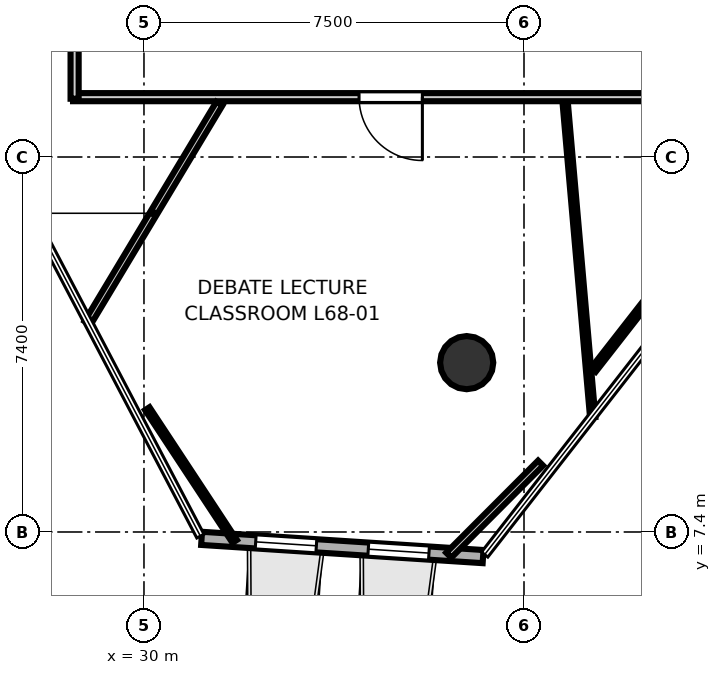
"""IFC4 building model, lengths in metres.
Left out: names, types, materials, properties, quantities, classifications, styles, units other than length and angle.
Written with IfcOpenShell. Run it as: python <this file> out.ifc"""

import sys

from ifc_helpers import new_model, si_unit, direction, frame, frame_2d, origin, origin_2d, place, context, subcontext, project, spatial, rectangle, hollow_circle, extrude, element, fill, save


model = new_model("IFC4")
c1 = context("Model", 3, precision=1e-05, world=origin(), true_north=direction((0.0, 1.0)))
c2 = subcontext(c1, "Body", "Model", "MODEL_VIEW")
j1 = project(units=[si_unit("LENGTHUNIT", "METRE"), si_unit("PLANEANGLEUNIT", "RADIAN")], contexts=[c1])
p1 = place(None, origin())
s1 = spatial("IfcSite", under=j1, at=p1, CompositionType="ELEMENT")
p2 = place(p1, origin())
s2 = spatial("IfcBuilding", under=s1, at=p2, CompositionType="ELEMENT")
p3 = place(p2, frame((0.0, 0.0, 264.9)))
s3 = spatial("IfcBuildingStorey", under=s2, at=p3, CompositionType="ELEMENT", Elevation=264.9)
p4 = place(p3, frame((36.369, 10.742, 0.0), z_axis=(0.0, 0.0, 1.0), x_axis=(1.0, 0.0, 0.0)))
e1 = element("IfcColumn", 1, at=p4, inside=s3, PredefinedType="COLUMN", context=c2, shape_type="SweptSolid", body=[
    extrude(hollow_circle(Radius=0.525, WallThickness=0.028, at=origin_2d()), origin(), (0.0, 0.0, 1.0), 3.7),
])
p5 = place(p3, frame((31.137, 7.274, 0.0), z_axis=(0.0, 0.0, 1.0), x_axis=(0.997908734758, -0.064638665628, 0.0)))
e2 = element("IfcWall", 2, at=p5, inside=s3, PredefinedType="SOLIDWALL", context=c2, shape_type="SweptSolid", body=[
    extrude(rectangle(XDim=5.567, YDim=0.26, at=frame_2d((2.784, 0.0))), origin(), (0.0, 0.0, 1.0), 3.52),
])
p6 = place(p5, frame((1.07, 0.0, 0.9)))
e3 = element("IfcOpeningElement", 3, at=p6, cuts=e2, PredefinedType="OPENING", context=c2, shape_type="SweptSolid", body=[
    extrude(rectangle(XDim=1.2, YDim=2.0, at=frame_2d((0.6, 1.0))), frame((0.0, 0.14, 0.0), z_axis=(0.0, -1.0, 0.0), x_axis=(1.0, 0.0, 0.0)), (0.0, 0.0, 1.0), 0.28),
])
p7 = place(p5, frame((3.297, 0.0, 0.9)))
e4 = element("IfcOpeningElement", 4, at=p7, cuts=e2, PredefinedType="OPENING", context=c2, shape_type="SweptSolid", body=[
    extrude(rectangle(XDim=1.2, YDim=2.0, at=frame_2d((0.6, 1.0))), frame((0.0, 0.14, 0.0), z_axis=(0.0, -1.0, 0.0), x_axis=(1.0, 0.0, 0.0)), (0.0, 0.0, 1.0), 0.28),
])
p8 = place(p3, frame((43.787, 15.981, 0.0), z_axis=(0.0, 0.0, 1.0), x_axis=(-1.0, 0.0, 0.0)))
e5 = element("IfcWall", 5, at=p8, inside=s3, PredefinedType="PARTITIONING", context=c2, shape_type="SweptSolid", body=[
    extrude(rectangle(XDim=15.187, YDim=0.16, at=frame_2d((7.594, 0.0))), origin(), (0.0, 0.0, 1.0), 2.84),
])
p9 = place(p8, frame((8.293, 0.0, 0.0)))
e6 = element("IfcOpeningElement", 6, at=p9, cuts=e5, PredefinedType="OPENING", context=c2, shape_type="SweptSolid", body=[
    extrude(rectangle(XDim=1.25, YDim=2.2, at=frame_2d((0.625, 1.1))), frame((0.0, 0.09, 0.0), z_axis=(0.0, -1.0, 0.0), x_axis=(1.0, 0.0, 0.0)), (0.0, 0.0, 1.0), 0.18),
])
p10 = place(p3, frame((28.631, 15.95, 0.0), z_axis=(0.0, 0.0, 1.0), x_axis=(0.0, 1.0, 0.0)))
e7 = element("IfcWall", 7, at=p10, inside=s3, PredefinedType="PARTITIONING", context=c2, shape_type="SweptSolid", body=[
    extrude(rectangle(XDim=2.0, YDim=0.16, at=frame_2d((1.0, 0.0))), origin(), (0.0, 0.0, 1.0), 2.84),
])
p11 = place(p3, frame((28.888, 11.525, 0.0), z_axis=(0.0, 0.0, 1.0), x_axis=(0.515078578038, 0.857142962665, 0.0)))
e8 = element("IfcWall", 8, at=p11, inside=s3, PredefinedType="PARTITIONING", context=c2, shape_type="SweptSolid", body=[
    extrude(rectangle(XDim=5.05, YDim=0.14, at=frame_2d((2.525, 0.0))), origin(), (0.0, 0.0, 1.0), 2.84),
])
p12 = place(p3, frame((38.313, 15.867, 0.0), z_axis=(0.0, 0.0, 1.0), x_axis=(0.0871304677, -0.996196909049, 0.0)))
e9 = element("IfcWall", 9, at=p12, inside=s3, PredefinedType="PARTITIONING", context=c2, shape_type="SweptSolid", body=[
    extrude(rectangle(XDim=6.226, YDim=0.105, at=frame_2d((3.113, 0.0))), origin(), (0.0, 0.0, 1.0), 2.84),
])
p13 = place(p3, frame((37.827, 8.759, 0.0), z_axis=(0.0, 0.0, 1.0), x_axis=(-0.706250202139, -0.707962323841, 0.0)))
e10 = element("IfcWall", 10, at=p13, inside=s3, PredefinedType="PARTITIONING", context=c2, shape_type="SweptSolid", body=[
    extrude(rectangle(XDim=2.567, YDim=0.14, at=frame_2d((1.283, 0.0))), origin(), (0.0, 0.0, 1.0), 2.84),
])
p14 = place(p3, frame((31.79, 7.215, 0.0), z_axis=(0.0, 0.0, 1.0), x_axis=(-0.550128311688, 0.835080140273, 0.0)))
e11 = element("IfcWall", 11, at=p14, inside=s3, PredefinedType="PARTITIONING", context=c2, shape_type="SweptSolid", body=[
    extrude(rectangle(XDim=3.136, YDim=0.105, at=frame_2d((1.568, 0.0))), origin(), (0.0, 0.0, 1.0), 2.84),
])
p15 = place(p3, frame((55.174, 31.494, 0.0), z_axis=(0.0, 0.0, 1.0), x_axis=(-0.615208730104, -0.788364267584, 0.0)))
e12 = element("IfcWall", 12, at=p15, inside=s3, PredefinedType="PARTITIONING", context=c2, shape_type="SweptSolid", body=[
    extrude(rectangle(XDim=26.507, YDim=0.12, at=frame_2d((13.253, 0.0))), origin(), (0.0, 0.0, 1.0), 2.84),
])
p16 = place(p9, origin())
e13 = element("IfcDoor", 13, at=p16, inside=s3, OperationType="SINGLE_SWING_LEFT", PredefinedType="DOOR", context=c2, shape_type="SweptSolid", body=[
    extrude(rectangle(XDim=1.25, YDim=2.2, at=frame_2d((0.625, 1.1))), frame((0.0, 0.025, 0.0), z_axis=(0.0, -1.0, 0.0), x_axis=(1.0, 0.0, 0.0)), (0.0, 0.0, 1.0), 0.05),
])
fill(e6, e13)
p17 = place(p6, origin())
e14 = element("IfcWindow", 14, at=p17, inside=s3, PartitioningType="SINGLE_PANEL", PredefinedType="WINDOW", context=c2, shape_type="SweptSolid", body=[
    extrude(rectangle(XDim=1.2, YDim=2.0, at=frame_2d((0.6, 1.0))), frame((0.0, 0.03, 0.0), z_axis=(0.0, -1.0, 0.0), x_axis=(1.0, 0.0, 0.0)), (0.0, 0.0, 1.0), 0.06),
])
fill(e3, e14)
p18 = place(p7, origin())
e15 = element("IfcWindow", 15, at=p18, inside=s3, PartitioningType="SINGLE_PANEL", PredefinedType="WINDOW", context=c2, shape_type="SweptSolid", body=[
    extrude(rectangle(XDim=1.2, YDim=2.0, at=frame_2d((0.6, 1.0))), frame((0.0, 0.03, 0.0), z_axis=(0.0, -1.0, 0.0), x_axis=(1.0, 0.0, 0.0)), (0.0, 0.0, 1.0), 0.06),
])
fill(e4, e15)
save(model, sys.argv[1])
